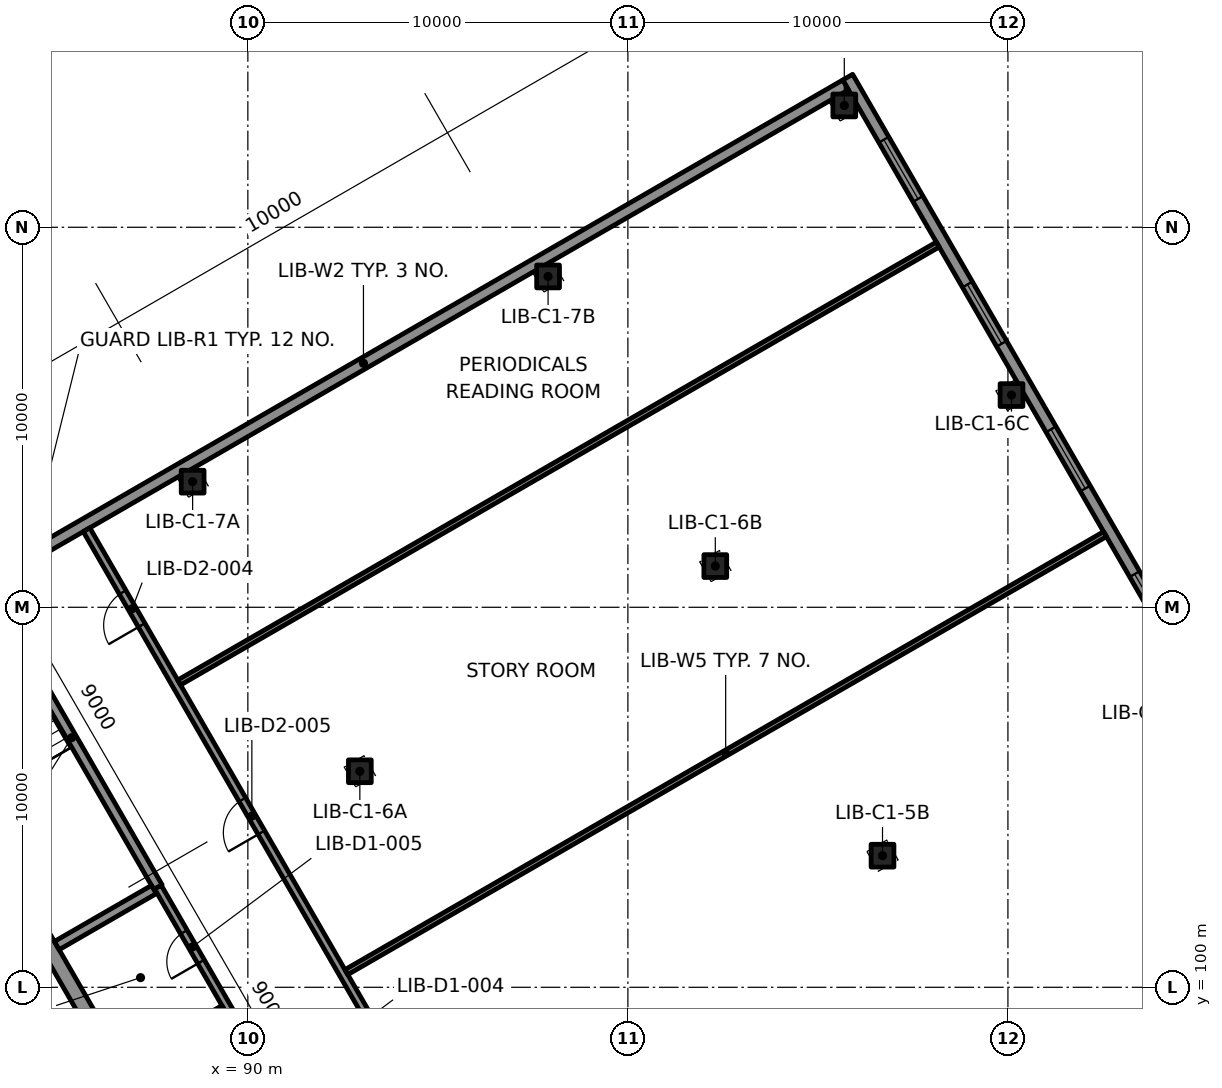
"""IFC4 building model, lengths in metres.
Left out: names, types, materials, properties, quantities, classifications, styles, units other than length and angle.
Written with IfcOpenShell. Run it as: python <this file> out.ifc"""

import sys

from ifc_helpers import new_model, si_unit, direction, frame, frame_2d, origin, origin_2d, place, context, subcontext, project, spatial, rectangle, extrude, element, fill, save


model = new_model("IFC4")
c1 = context("Model", 3, precision=1e-05, world=origin(), true_north=direction((0.0, 1.0)))
c2 = subcontext(c1, "Body", "Model", "MODEL_VIEW")
j1 = project(units=[si_unit("LENGTHUNIT", "METRE"), si_unit("PLANEANGLEUNIT", "RADIAN")], contexts=[c1])
p1 = place(None, origin())
s1 = spatial("IfcSite", under=j1, at=p1, CompositionType="ELEMENT")
p2 = place(p1, origin())
s2 = spatial("IfcBuilding", under=s1, at=p2, CompositionType="ELEMENT")
p3 = place(p2, frame((0.0, 0.0, 8.0)))
s3 = spatial("IfcBuildingStorey", under=s2, at=p3, CompositionType="ELEMENT", Elevation=8.0)
for number, where, z_axis, x_axis in (
    (1, (106.7, 103.463, -0.36), (0.0, 0.0, 1.0), (1.0, 0.0, 0.0)),
    (2, (92.947, 105.684, -0.36), (0.0, 0.0, 1.0), (1.0, 0.0, 0.0)),
    (3, (102.3, 111.084, -0.36), (0.0, 0.0, 1.0), (1.0, 0.0, 0.0)),
    (4, (110.094, 115.584, -0.36), (0.0, 0.0, 1.0), (1.0, 0.0, 0.0)),
    (5, (88.547, 113.305, -0.36), (0.0, 0.0, 1.0), (1.0, 0.0, 0.0)),
    (6, (97.9, 118.705, -0.36), (0.0, 0.0, 1.0), (1.0, 0.0, 0.0)),
    (7, (105.694, 123.205, -0.36), (0.0, 0.0, 1.0), (1.0, 0.0, 0.0)),
):
    element("IfcColumn", number, at=place(p3, frame(where, z_axis=z_axis, x_axis=x_axis)), inside=s3, PredefinedType="COLUMN", context=c2, shape_type="SweptSolid", body=[
        extrude(rectangle(XDim=0.6, YDim=0.6, at=origin_2d()), origin(), (0.0, 0.0, 1.0), 4.6),
    ])
p4 = place(p3, frame((107.106, 62.36, 0.0), z_axis=(0.0, 0.0, 1.0), x_axis=(-0.49999992739, 0.866025445706, 0.0)))
e8 = element("IfcWall", 8, at=p4, inside=s3, PredefinedType="SOLIDWALL", context=c2, shape_type="SweptSolid", body=[
    extrude(rectangle(XDim=54.0, YDim=0.4, at=frame_2d((27.0, 0.0))), origin(), (0.0, 0.0, 1.0), 4.24),
])
p5 = place(p3, frame((132.784, 77.185, 0.0), z_axis=(0.0, 0.0, 1.0), x_axis=(-0.49999992739, 0.866025445706, 0.0)))
e9 = element("IfcWall", 9, at=p5, inside=s3, PredefinedType="SOLIDWALL", context=c2, shape_type="SweptSolid", body=[
    extrude(rectangle(XDim=54.0, YDim=0.3, at=frame_2d((27.0, 0.0))), origin(), (0.0, 0.0, 1.0), 4.24),
])
p6 = place(p5, frame((1.9, 0.0, 0.9)))
e10 = element("IfcOpeningElement", 10, at=p6, cuts=e9, PredefinedType="OPENING", context=c2, shape_type="SweptSolid", body=[
    extrude(rectangle(XDim=1.8, YDim=2.4, at=frame_2d((0.9, 1.2))), frame((0.0, 0.16, 0.0), z_axis=(0.0, -1.0, 0.0), x_axis=(1.0, 0.0, 0.0)), (0.0, 0.0, 1.0), 0.32),
])
p7 = place(p5, frame((6.3, 0.0, 0.9)))
e11 = element("IfcOpeningElement", 11, at=p7, cuts=e9, PredefinedType="OPENING", context=c2, shape_type="SweptSolid", body=[
    extrude(rectangle(XDim=1.8, YDim=2.4, at=frame_2d((0.9, 1.2))), frame((0.0, 0.16, 0.0), z_axis=(0.0, -1.0, 0.0), x_axis=(1.0, 0.0, 0.0)), (0.0, 0.0, 1.0), 0.32),
])
p8 = place(p5, frame((10.7, 0.0, 0.9)))
e12 = element("IfcOpeningElement", 12, at=p8, cuts=e9, PredefinedType="OPENING", context=c2, shape_type="SweptSolid", body=[
    extrude(rectangle(XDim=1.8, YDim=2.4, at=frame_2d((0.9, 1.2))), frame((0.0, 0.16, 0.0), z_axis=(0.0, -1.0, 0.0), x_axis=(1.0, 0.0, 0.0)), (0.0, 0.0, 1.0), 0.32),
])
p9 = place(p5, frame((15.1, 0.0, 0.9)))
e13 = element("IfcOpeningElement", 13, at=p9, cuts=e9, PredefinedType="OPENING", context=c2, shape_type="SweptSolid", body=[
    extrude(rectangle(XDim=1.8, YDim=2.4, at=frame_2d((0.9, 1.2))), frame((0.0, 0.16, 0.0), z_axis=(0.0, -1.0, 0.0), x_axis=(1.0, 0.0, 0.0)), (0.0, 0.0, 1.0), 0.32),
])
p10 = place(p5, frame((19.5, 0.0, 0.9)))
e14 = element("IfcOpeningElement", 14, at=p10, cuts=e9, PredefinedType="OPENING", context=c2, shape_type="SweptSolid", body=[
    extrude(rectangle(XDim=1.8, YDim=2.4, at=frame_2d((0.9, 1.2))), frame((0.0, 0.16, 0.0), z_axis=(0.0, -1.0, 0.0), x_axis=(1.0, 0.0, 0.0)), (0.0, 0.0, 1.0), 0.32),
])
p11 = place(p5, frame((23.9, 0.0, 0.9)))
e15 = element("IfcOpeningElement", 15, at=p11, cuts=e9, PredefinedType="OPENING", context=c2, shape_type="SweptSolid", body=[
    extrude(rectangle(XDim=1.8, YDim=2.4, at=frame_2d((0.9, 1.2))), frame((0.0, 0.16, 0.0), z_axis=(0.0, -1.0, 0.0), x_axis=(1.0, 0.0, 0.0)), (0.0, 0.0, 1.0), 0.32),
])
p12 = place(p5, frame((28.3, 0.0, 0.9)))
e16 = element("IfcOpeningElement", 16, at=p12, cuts=e9, PredefinedType="OPENING", context=c2, shape_type="SweptSolid", body=[
    extrude(rectangle(XDim=1.8, YDim=2.4, at=frame_2d((0.9, 1.2))), frame((0.0, 0.16, 0.0), z_axis=(0.0, -1.0, 0.0), x_axis=(1.0, 0.0, 0.0)), (0.0, 0.0, 1.0), 0.32),
])
p13 = place(p5, frame((32.7, 0.0, 0.9)))
e17 = element("IfcOpeningElement", 17, at=p13, cuts=e9, PredefinedType="OPENING", context=c2, shape_type="SweptSolid", body=[
    extrude(rectangle(XDim=1.8, YDim=2.4, at=frame_2d((0.9, 1.2))), frame((0.0, 0.16, 0.0), z_axis=(0.0, -1.0, 0.0), x_axis=(1.0, 0.0, 0.0)), (0.0, 0.0, 1.0), 0.32),
])
p14 = place(p5, frame((37.1, 0.0, 0.9)))
e18 = element("IfcOpeningElement", 18, at=p14, cuts=e9, PredefinedType="OPENING", context=c2, shape_type="SweptSolid", body=[
    extrude(rectangle(XDim=1.8, YDim=2.4, at=frame_2d((0.9, 1.2))), frame((0.0, 0.16, 0.0), z_axis=(0.0, -1.0, 0.0), x_axis=(1.0, 0.0, 0.0)), (0.0, 0.0, 1.0), 0.32),
])
p15 = place(p5, frame((41.5, 0.0, 0.9)))
e19 = element("IfcOpeningElement", 19, at=p15, cuts=e9, PredefinedType="OPENING", context=c2, shape_type="SweptSolid", body=[
    extrude(rectangle(XDim=1.8, YDim=2.4, at=frame_2d((0.9, 1.2))), frame((0.0, 0.16, 0.0), z_axis=(0.0, -1.0, 0.0), x_axis=(1.0, 0.0, 0.0)), (0.0, 0.0, 1.0), 0.32),
])
p16 = place(p5, frame((45.9, 0.0, 0.9)))
e20 = element("IfcOpeningElement", 20, at=p16, cuts=e9, PredefinedType="OPENING", context=c2, shape_type="SweptSolid", body=[
    extrude(rectangle(XDim=1.8, YDim=2.4, at=frame_2d((0.9, 1.2))), frame((0.0, 0.16, 0.0), z_axis=(0.0, -1.0, 0.0), x_axis=(1.0, 0.0, 0.0)), (0.0, 0.0, 1.0), 0.32),
])
p17 = place(p5, frame((50.3, 0.0, 0.9)))
e21 = element("IfcOpeningElement", 21, at=p17, cuts=e9, PredefinedType="OPENING", context=c2, shape_type="SweptSolid", body=[
    extrude(rectangle(XDim=1.8, YDim=2.4, at=frame_2d((0.9, 1.2))), frame((0.0, 0.16, 0.0), z_axis=(0.0, -1.0, 0.0), x_axis=(1.0, 0.0, 0.0)), (0.0, 0.0, 1.0), 0.32),
])
p18 = place(p3, frame((80.354, 109.095, 0.0), z_axis=(0.0, 0.0, 1.0), x_axis=(0.866026568746, 0.499997982221, 0.0)))
e22 = element("IfcWall", 22, at=p18, inside=s3, PredefinedType="SOLIDWALL", context=c2, shape_type="SweptSolid", body=[
    extrude(rectangle(XDim=29.3, YDim=0.3, at=frame_2d((14.65, 0.0))), origin(), (0.0, 0.0, 1.0), 4.24),
])
p19 = place(p3, frame((87.635, 102.635, 0.0), z_axis=(0.0, 0.0, 1.0), x_axis=(-0.499994616197, 0.866028512102, 0.0)))
e23 = element("IfcWall", 23, at=p19, inside=s3, PredefinedType="SOLIDWALL", context=c2, shape_type="SweptSolid", body=[
    extrude(rectangle(XDim=9.085, YDim=0.25, at=frame_2d((4.542, 0.0))), origin(), (0.0, 0.0, 1.0), 4.24),
])
p20 = place(p19, frame((7.885, 0.0, 0.0)))
e24 = element("IfcOpeningElement", 24, at=p20, cuts=e23, PredefinedType="OPENING", context=c2, shape_type="SweptSolid", body=[
    extrude(rectangle(XDim=1.0, YDim=2.1, at=frame_2d((0.5, 1.05))), frame((0.0, 0.135, 0.0), z_axis=(0.0, -1.0, 0.0), x_axis=(1.0, 0.0, 0.0)), (0.0, 0.0, 1.0), 0.27),
])
p21 = place(p3, frame((94.93, 90.0, 0.0), z_axis=(0.0, 0.0, 1.0), x_axis=(-0.499997667785, 0.866026750285, 0.0)))
e25 = element("IfcWall", 25, at=p21, inside=s3, PredefinedType="PARTITIONING", context=c2, shape_type="SweptSolid", body=[
    extrude(rectangle(XDim=14.59, YDim=0.2, at=frame_2d((7.295, 0.0))), origin(), (0.0, 0.0, 1.0), 4.24),
])
p22 = place(p21, frame((1.235, 0.0, 0.0)))
e26 = element("IfcOpeningElement", 26, at=p22, cuts=e25, PredefinedType="OPENING", context=c2, shape_type="SweptSolid", body=[
    extrude(rectangle(XDim=1.0, YDim=2.1, at=frame_2d((0.5, 1.05))), frame((0.0, 0.11, 0.0), z_axis=(0.0, -1.0, 0.0), x_axis=(1.0, 0.0, 0.0)), (0.0, 0.0, 1.0), 0.22),
])
p23 = place(p21, frame((4.275, 0.0, 0.0)))
e27 = element("IfcOpeningElement", 27, at=p23, cuts=e25, PredefinedType="OPENING", context=c2, shape_type="SweptSolid", body=[
    extrude(rectangle(XDim=0.9, YDim=2.1, at=frame_2d((0.45, 1.05))), frame((0.0, 0.11, 0.0), z_axis=(0.0, -1.0, 0.0), x_axis=(1.0, 0.0, 0.0)), (0.0, 0.0, 1.0), 0.22),
])
p24 = place(p21, frame((8.025, 0.0, 0.0)))
e28 = element("IfcOpeningElement", 28, at=p24, cuts=e25, PredefinedType="OPENING", context=c2, shape_type="SweptSolid", body=[
    extrude(rectangle(XDim=0.9, YDim=2.1, at=frame_2d((0.45, 1.05))), frame((0.0, 0.11, 0.0), z_axis=(0.0, -1.0, 0.0), x_axis=(1.0, 0.0, 0.0)), (0.0, 0.0, 1.0), 0.22),
])
p25 = place(p21, frame((12.325, 0.0, 0.0)))
e29 = element("IfcOpeningElement", 29, at=p25, cuts=e25, PredefinedType="OPENING", context=c2, shape_type="SweptSolid", body=[
    extrude(rectangle(XDim=0.9, YDim=2.1, at=frame_2d((0.45, 1.05))), frame((0.0, 0.11, 0.0), z_axis=(0.0, -1.0, 0.0), x_axis=(1.0, 0.0, 0.0)), (0.0, 0.0, 1.0), 0.22),
])
p26 = place(p3, frame((86.779, 97.967, 0.0), z_axis=(0.0, 0.0, 1.0), x_axis=(0.866053027861, 0.499952150643, 0.0)))
e30 = element("IfcWall", 30, at=p26, inside=s3, PredefinedType="PARTITIONING", context=c2, shape_type="SweptSolid", body=[
    extrude(rectangle(XDim=2.975, YDim=0.15, at=frame_2d((1.487, 0.0))), origin(), (0.0, 0.0, 1.0), 4.24),
])
p27 = place(p3, frame((84.972, 101.097, 0.0), z_axis=(0.0, 0.0, 1.0), x_axis=(0.866039495442, 0.49997559174, 0.0)))
e31 = element("IfcWall", 31, at=p27, inside=s3, PredefinedType="SOLIDWALL", context=c2, shape_type="SweptSolid", body=[
    extrude(rectangle(XDim=2.95, YDim=0.25, at=frame_2d((1.475, 0.0))), origin(), (0.0, 0.0, 1.0), 4.24),
])
p28 = place(p3, frame((112.496, 65.725, 0.0), z_axis=(0.0, 0.0, 1.0), x_axis=(-0.499998673217, 0.866026169802, 0.0)))
e32 = element("IfcWall", 32, at=p28, inside=s3, PredefinedType="PARTITIONING", context=c2, shape_type="SweptSolid", body=[
    extrude(rectangle(XDim=53.48, YDim=0.2, at=frame_2d((26.74, 0.0))), origin(), (0.0, 0.0, 1.0), 4.24),
])
p29 = place(p28, frame((13.08, 0.0, 0.0)))
e33 = element("IfcOpeningElement", 33, at=p29, cuts=e32, PredefinedType="OPENING", context=c2, shape_type="SweptSolid", body=[
    extrude(rectangle(XDim=1.0, YDim=2.1, at=frame_2d((0.5, 1.05))), frame((0.0, 0.11, 0.0), z_axis=(0.0, -1.0, 0.0), x_axis=(1.0, 0.0, 0.0)), (0.0, 0.0, 1.0), 0.22),
])
p30 = place(p28, frame((25.88, 0.0, 0.0)))
e34 = element("IfcOpeningElement", 34, at=p30, cuts=e32, PredefinedType="OPENING", context=c2, shape_type="SweptSolid", body=[
    extrude(rectangle(XDim=1.8, YDim=2.1, at=frame_2d((0.9, 1.05))), frame((0.0, 0.11, 0.0), z_axis=(0.0, -1.0, 0.0), x_axis=(1.0, 0.0, 0.0)), (0.0, 0.0, 1.0), 0.22),
])
p31 = place(p28, frame((50.58, 0.0, 0.0)))
e35 = element("IfcOpeningElement", 35, at=p31, cuts=e32, PredefinedType="OPENING", context=c2, shape_type="SweptSolid", body=[
    extrude(rectangle(XDim=1.0, YDim=2.1, at=frame_2d((0.5, 1.05))), frame((0.0, 0.11, 0.0), z_axis=(0.0, -1.0, 0.0), x_axis=(1.0, 0.0, 0.0)), (0.0, 0.0, 1.0), 0.22),
])
p32 = place(p28, frame((44.28, 0.0, 0.0)))
e36 = element("IfcOpeningElement", 36, at=p32, cuts=e32, PredefinedType="OPENING", context=c2, shape_type="SweptSolid", body=[
    extrude(rectangle(XDim=1.0, YDim=2.1, at=frame_2d((0.5, 1.05))), frame((0.0, 0.11, 0.0), z_axis=(0.0, -1.0, 0.0), x_axis=(1.0, 0.0, 0.0)), (0.0, 0.0, 1.0), 0.22),
])
for number, where, z_axis, x_axis in (
    (37, (92.592, 100.399, 0.0), (0.0, 0.0, 1.0), (0.866, 0.5, 0.0)),
    (38, (88.192, 108.02, 0.0), (0.0, 0.0, 1.0), (0.866, 0.5, 0.0)),
):
    element("IfcWall", number, at=place(p3, frame(where, z_axis=z_axis, x_axis=x_axis)), inside=s3, PredefinedType="PARTITIONING", context=c2, shape_type="SweptSolid", body=[
        extrude(rectangle(XDim=23.05, YDim=0.15, at=frame_2d((11.525, 0.0))), origin(), (0.0, 0.0, 1.0), 4.24),
    ])
p33 = place(p14, origin())
e39 = element("IfcWindow", 39, at=p33, inside=s3, PartitioningType="SINGLE_PANEL", PredefinedType="WINDOW", context=c2, shape_type="SweptSolid", body=[
    extrude(rectangle(XDim=1.8, YDim=2.4, at=frame_2d((0.9, 1.2))), frame((0.0, 0.03, 0.0), z_axis=(0.0, -1.0, 0.0), x_axis=(1.0, 0.0, 0.0)), (0.0, 0.0, 1.0), 0.06),
])
fill(e18, e39)
p34 = place(p15, origin())
e40 = element("IfcWindow", 40, at=p34, inside=s3, PartitioningType="SINGLE_PANEL", PredefinedType="WINDOW", context=c2, shape_type="SweptSolid", body=[
    extrude(rectangle(XDim=1.8, YDim=2.4, at=frame_2d((0.9, 1.2))), frame((0.0, 0.03, 0.0), z_axis=(0.0, -1.0, 0.0), x_axis=(1.0, 0.0, 0.0)), (0.0, 0.0, 1.0), 0.06),
])
fill(e19, e40)
p35 = place(p16, origin())
e41 = element("IfcWindow", 41, at=p35, inside=s3, PartitioningType="SINGLE_PANEL", PredefinedType="WINDOW", context=c2, shape_type="SweptSolid", body=[
    extrude(rectangle(XDim=1.8, YDim=2.4, at=frame_2d((0.9, 1.2))), frame((0.0, 0.03, 0.0), z_axis=(0.0, -1.0, 0.0), x_axis=(1.0, 0.0, 0.0)), (0.0, 0.0, 1.0), 0.06),
])
fill(e20, e41)
p36 = place(p17, origin())
e42 = element("IfcWindow", 42, at=p36, inside=s3, PartitioningType="SINGLE_PANEL", PredefinedType="WINDOW", context=c2, shape_type="SweptSolid", body=[
    extrude(rectangle(XDim=1.8, YDim=2.4, at=frame_2d((0.9, 1.2))), frame((0.0, 0.03, 0.0), z_axis=(0.0, -1.0, 0.0), x_axis=(1.0, 0.0, 0.0)), (0.0, 0.0, 1.0), 0.06),
])
fill(e21, e42)
p37 = place(p25, origin())
e43 = element("IfcDoor", 43, at=p37, inside=s3, OperationType="SINGLE_SWING_LEFT", PredefinedType="DOOR", context=c2, shape_type="SweptSolid", body=[
    extrude(rectangle(XDim=0.9, YDim=2.1, at=frame_2d((0.45, 1.05))), frame((0.0, 0.025, 0.0), z_axis=(0.0, -1.0, 0.0), x_axis=(1.0, 0.0, 0.0)), (0.0, 0.0, 1.0), 0.05),
])
fill(e29, e43)
p38 = place(p31, origin())
e44 = element("IfcDoor", 44, at=p38, inside=s3, OperationType="SINGLE_SWING_LEFT", PredefinedType="DOOR", context=c2, shape_type="SweptSolid", body=[
    extrude(rectangle(XDim=1.0, YDim=2.1, at=frame_2d((0.5, 1.05))), frame((0.0, 0.025, 0.0), z_axis=(0.0, -1.0, 0.0), x_axis=(1.0, 0.0, 0.0)), (0.0, 0.0, 1.0), 0.05),
])
fill(e35, e44)
p39 = place(p32, origin())
e45 = element("IfcDoor", 45, at=p39, inside=s3, OperationType="SINGLE_SWING_RIGHT", PredefinedType="DOOR", context=c2, shape_type="SweptSolid", body=[
    extrude(rectangle(XDim=1.0, YDim=2.1, at=frame_2d((0.5, 1.05))), frame((0.0, 0.025, 0.0), z_axis=(0.0, -1.0, 0.0), x_axis=(1.0, 0.0, 0.0)), (0.0, 0.0, 1.0), 0.05),
])
fill(e36, e45)
save(model, sys.argv[1])
